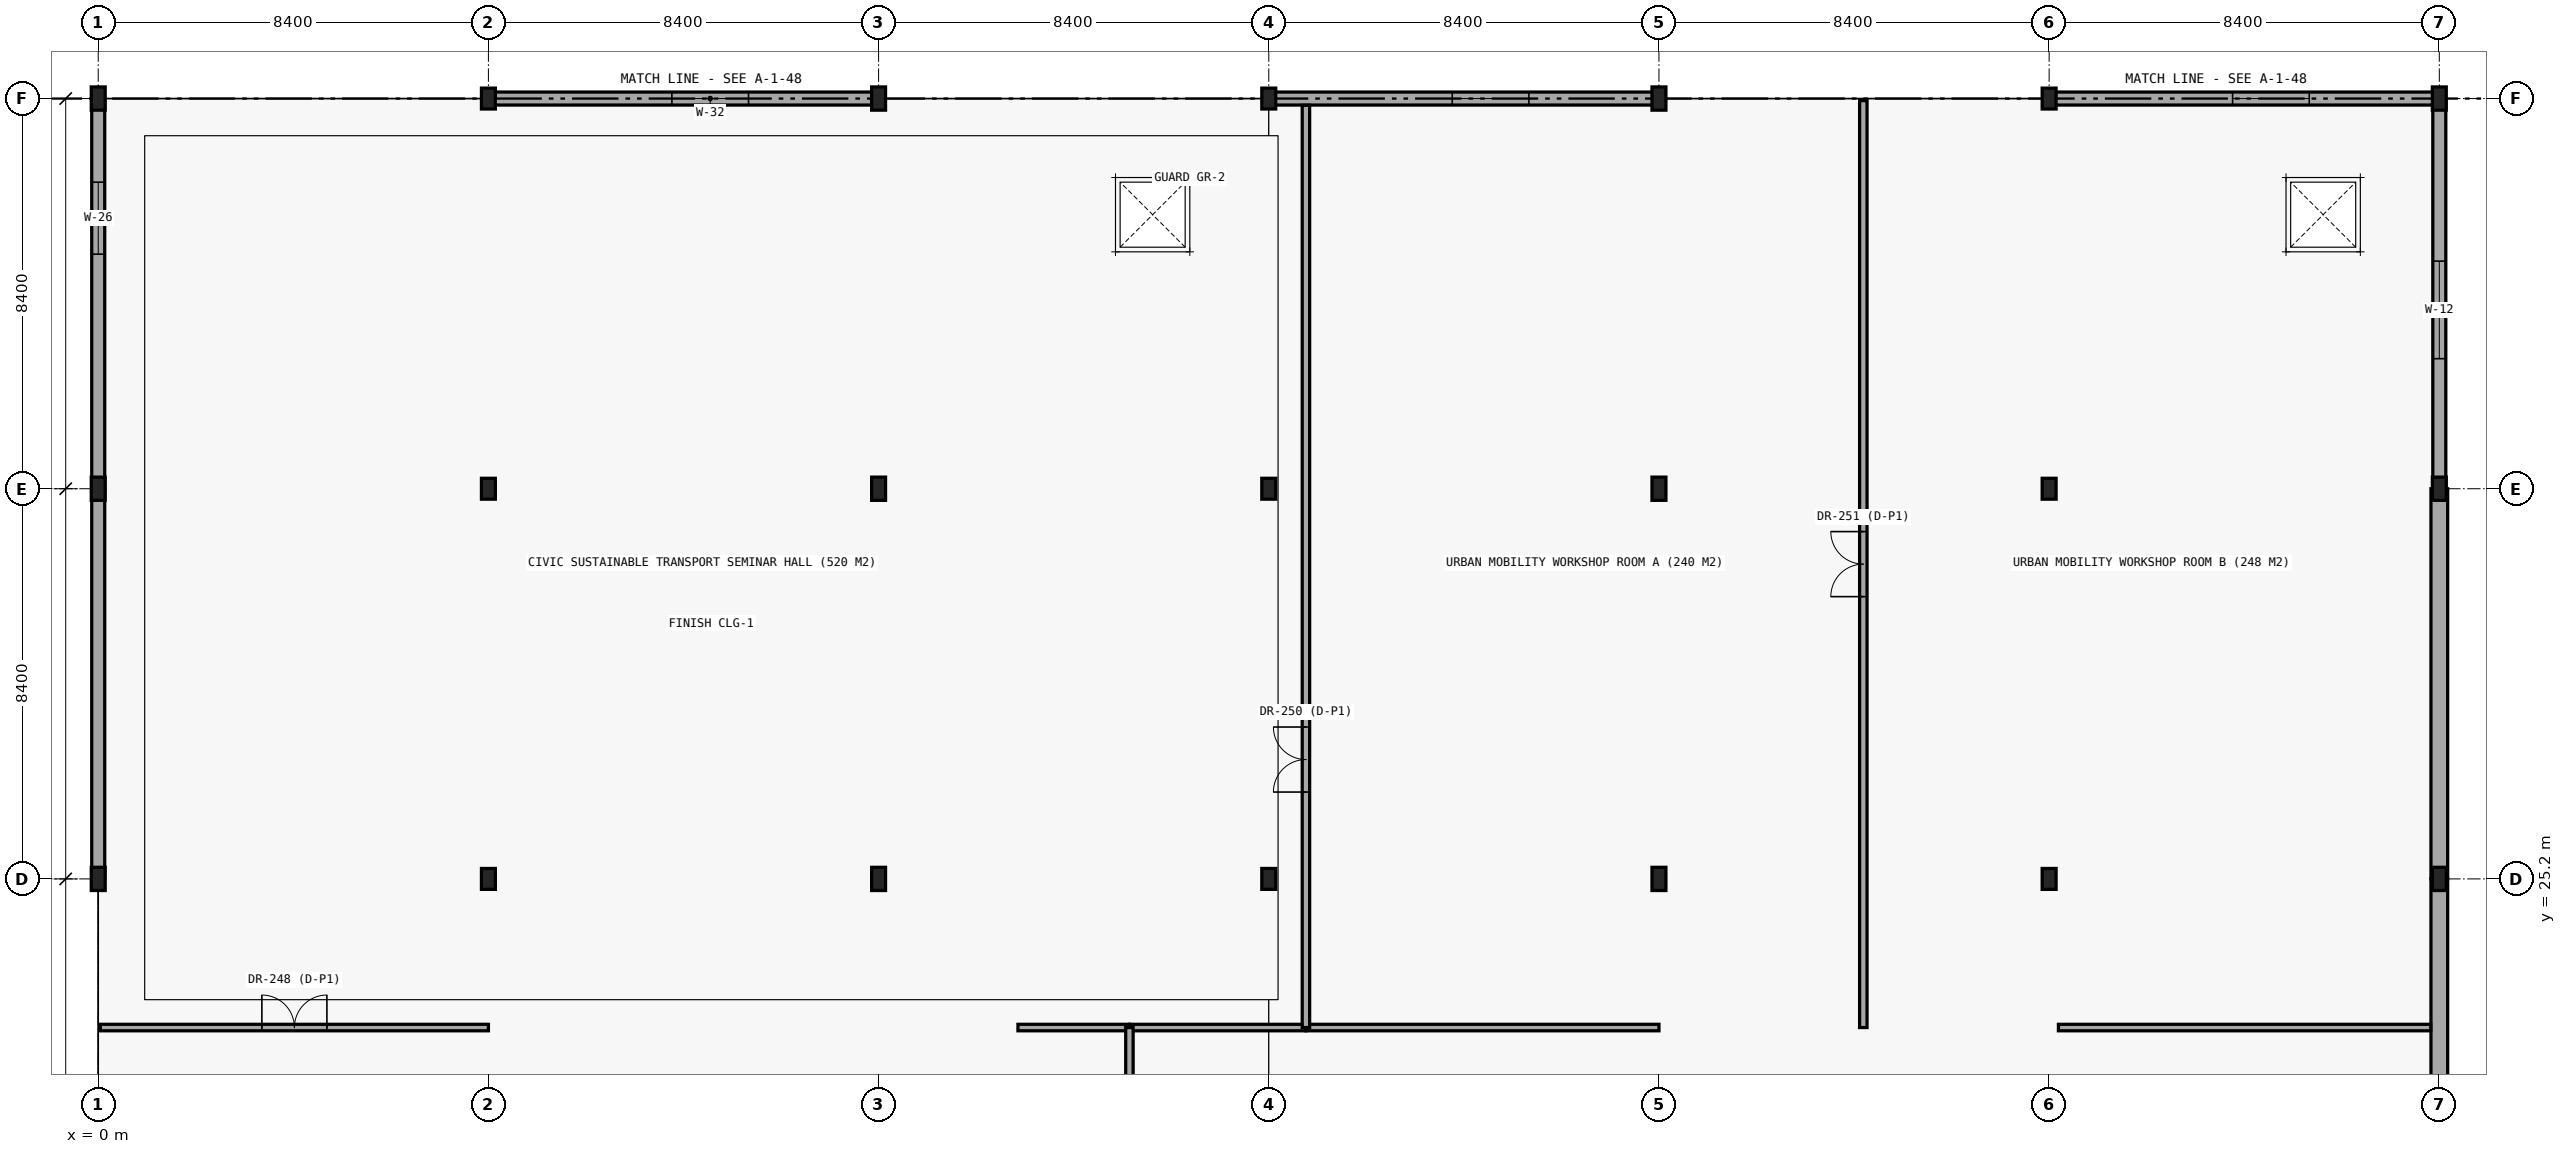
"""IFC4 building model, lengths in metres.
Left out: names, types, materials, properties, quantities, classifications, styles, units other than length and angle.
Written with IfcOpenShell. Run it as: python <this file> out.ifc"""

import sys

from ifc_helpers import new_model, si_unit, direction, frame, frame_2d, origin, origin_2d, place, context, subcontext, project, spatial, rectangle, i_section, extrude, element, fill, save


model = new_model("IFC4")
c1 = context("Model", 3, precision=1e-05, world=origin(), true_north=direction((0.0, 1.0)))
c2 = subcontext(c1, "Body", "Model", "MODEL_VIEW")
j1 = project(units=[si_unit("LENGTHUNIT", "METRE"), si_unit("PLANEANGLEUNIT", "RADIAN")], contexts=[c1])
p1 = place(None, origin())
s1 = spatial("IfcSite", under=j1, at=p1, CompositionType="ELEMENT")
p2 = place(p1, origin())
s2 = spatial("IfcBuilding", under=s1, at=p2, CompositionType="ELEMENT")
p3 = place(p2, frame((0.0, 0.0, 17.4)))
s3 = spatial("IfcBuildingStorey", under=s2, at=p3, CompositionType="ELEMENT", Elevation=17.4)
for number, where, z_axis, x_axis in (
    (1, (0.0, 25.2, 0.0), (0.0, 0.0, 1.0), (1.0, 0.0, 0.0)),
    (2, (0.0, 33.6, 0.0), (0.0, 0.0, 1.0), (1.0, 0.0, 0.0)),
    (3, (0.0, 42.0, 0.0), (0.0, 0.0, 1.0), (1.0, 0.0, 0.0)),
):
    element("IfcColumn", number, at=place(p3, frame(where, z_axis=z_axis, x_axis=x_axis)), inside=s3, PredefinedType="COLUMN", context=c2, shape_type="SweptSolid", body=[
        extrude(i_section(OverallWidth=0.3, OverallDepth=0.5, WebThickness=0.014, FlangeThickness=0.028, FilletRadius=0.027, at=origin_2d()), origin(), (0.0, 0.0, 1.0), 4.2),
    ])
for number, where, z_axis, x_axis in (
    (4, (8.4, 25.2, 0.0), (0.0, 0.0, 1.0), (1.0, 0.0, 0.0)),
    (5, (8.4, 33.6, 0.0), (0.0, 0.0, 1.0), (1.0, 0.0, 0.0)),
    (6, (8.4, 42.0, 0.0), (0.0, 0.0, 1.0), (1.0, 0.0, 0.0)),
):
    element("IfcColumn", number, at=place(p3, frame(where, z_axis=z_axis, x_axis=x_axis)), inside=s3, PredefinedType="COLUMN", context=c2, shape_type="SweptSolid", body=[
        extrude(i_section(OverallWidth=0.3, OverallDepth=0.45, WebThickness=0.014, FlangeThickness=0.026, FilletRadius=0.027, at=origin_2d()), origin(), (0.0, 0.0, 1.0), 4.2),
    ])
for number, where, z_axis, x_axis in (
    (7, (16.8, 25.2, 0.0), (0.0, 0.0, 1.0), (1.0, 0.0, 0.0)),
    (8, (16.8, 33.6, 0.0), (0.0, 0.0, 1.0), (1.0, 0.0, 0.0)),
    (9, (16.8, 42.0, 0.0), (0.0, 0.0, 1.0), (1.0, 0.0, 0.0)),
):
    element("IfcColumn", number, at=place(p3, frame(where, z_axis=z_axis, x_axis=x_axis)), inside=s3, PredefinedType="COLUMN", context=c2, shape_type="SweptSolid", body=[
        extrude(i_section(OverallWidth=0.3, OverallDepth=0.5, WebThickness=0.014, FlangeThickness=0.028, FilletRadius=0.027, at=origin_2d()), origin(), (0.0, 0.0, 1.0), 4.2),
    ])
for number, where, z_axis, x_axis in (
    (10, (25.2, 25.2, 0.0), (0.0, 0.0, 1.0), (1.0, 0.0, 0.0)),
    (11, (25.2, 33.6, 0.0), (0.0, 0.0, 1.0), (1.0, 0.0, 0.0)),
    (12, (25.2, 42.0, 0.0), (0.0, 0.0, 1.0), (1.0, 0.0, 0.0)),
):
    element("IfcColumn", number, at=place(p3, frame(where, z_axis=z_axis, x_axis=x_axis)), inside=s3, PredefinedType="COLUMN", context=c2, shape_type="SweptSolid", body=[
        extrude(i_section(OverallWidth=0.3, OverallDepth=0.45, WebThickness=0.014, FlangeThickness=0.026, FilletRadius=0.027, at=origin_2d()), origin(), (0.0, 0.0, 1.0), 4.2),
    ])
for number, where, z_axis, x_axis in (
    (13, (33.6, 25.2, 0.0), (0.0, 0.0, 1.0), (1.0, 0.0, 0.0)),
    (14, (33.6, 33.6, 0.0), (0.0, 0.0, 1.0), (1.0, 0.0, 0.0)),
    (15, (33.6, 42.0, 0.0), (0.0, 0.0, 1.0), (1.0, 0.0, 0.0)),
):
    element("IfcColumn", number, at=place(p3, frame(where, z_axis=z_axis, x_axis=x_axis)), inside=s3, PredefinedType="COLUMN", context=c2, shape_type="SweptSolid", body=[
        extrude(i_section(OverallWidth=0.3, OverallDepth=0.5, WebThickness=0.014, FlangeThickness=0.028, FilletRadius=0.027, at=origin_2d()), origin(), (0.0, 0.0, 1.0), 4.2),
    ])
for number, where, z_axis, x_axis in (
    (16, (42.0, 25.2, 0.0), (0.0, 0.0, 1.0), (1.0, 0.0, 0.0)),
    (17, (42.0, 33.6, 0.0), (0.0, 0.0, 1.0), (1.0, 0.0, 0.0)),
    (18, (42.0, 42.0, 0.0), (0.0, 0.0, 1.0), (1.0, 0.0, 0.0)),
):
    element("IfcColumn", number, at=place(p3, frame(where, z_axis=z_axis, x_axis=x_axis)), inside=s3, PredefinedType="COLUMN", context=c2, shape_type="SweptSolid", body=[
        extrude(i_section(OverallWidth=0.3, OverallDepth=0.45, WebThickness=0.014, FlangeThickness=0.026, FilletRadius=0.027, at=origin_2d()), origin(), (0.0, 0.0, 1.0), 4.2),
    ])
for number, where, z_axis, x_axis in (
    (19, (50.4, 25.2, 0.0), (0.0, 0.0, 1.0), (1.0, 0.0, 0.0)),
    (20, (50.4, 33.6, 0.0), (0.0, 0.0, 1.0), (1.0, 0.0, 0.0)),
    (21, (50.4, 42.0, 0.0), (0.0, 0.0, 1.0), (1.0, 0.0, 0.0)),
):
    element("IfcColumn", number, at=place(p3, frame(where, z_axis=z_axis, x_axis=x_axis)), inside=s3, PredefinedType="COLUMN", context=c2, shape_type="SweptSolid", body=[
        extrude(i_section(OverallWidth=0.3, OverallDepth=0.5, WebThickness=0.014, FlangeThickness=0.028, FilletRadius=0.027, at=origin_2d()), origin(), (0.0, 0.0, 1.0), 3.958),
    ])
p4 = place(p3, frame((0.0, 33.6, 0.0), z_axis=(0.0, 0.0, 1.0), x_axis=(0.0, -1.0, 0.0)))
e22 = element("IfcWall", 22, at=p4, inside=s3, PredefinedType="STANDARD", context=c2, shape_type="SweptSolid", body=[
    extrude(rectangle(XDim=8.4, YDim=0.28, at=frame_2d((4.2, 0.0))), origin(), (0.0, 0.0, 1.0), 3.62),
])
p5 = place(p3, frame((0.0, 42.0, 0.0), z_axis=(0.0, 0.0, 1.0), x_axis=(0.0, -1.0, 0.0)))
e23 = element("IfcWall", 23, at=p5, inside=s3, PredefinedType="STANDARD", context=c2, shape_type="SweptSolid", body=[
    extrude(rectangle(XDim=8.4, YDim=0.28, at=frame_2d((4.2, 0.0))), origin(), (0.0, 0.0, 1.0), 3.62),
])
p6 = place(p5, frame((1.8, 0.0, 0.85)))
e24 = element("IfcOpeningElement", 24, at=p6, cuts=e23, PredefinedType="OPENING", context=c2, shape_type="SweptSolid", body=[
    extrude(rectangle(XDim=1.55, YDim=2.45, at=frame_2d((0.775, 1.225))), frame((0.0, 0.15, 0.0), z_axis=(0.0, -1.0, 0.0), x_axis=(1.0, 0.0, 0.0)), (0.0, 0.0, 1.0), 0.3),
])
p7 = place(p3, frame((16.8, 42.0, 0.0), z_axis=(0.0, 0.0, 1.0), x_axis=(-1.0, 0.0, 0.0)))
e25 = element("IfcWall", 25, at=p7, inside=s3, PredefinedType="STANDARD", context=c2, shape_type="SweptSolid", body=[
    extrude(rectangle(XDim=8.4, YDim=0.28, at=frame_2d((4.2, 0.0))), origin(), (0.0, 0.0, 1.0), 3.62),
])
p8 = place(p7, frame((2.8, 0.0, 0.85)))
e26 = element("IfcOpeningElement", 26, at=p8, cuts=e25, PredefinedType="OPENING", context=c2, shape_type="SweptSolid", body=[
    extrude(rectangle(XDim=1.65, YDim=2.15, at=frame_2d((0.825, 1.075))), frame((0.0, 0.15, 0.0), z_axis=(0.0, -1.0, 0.0), x_axis=(1.0, 0.0, 0.0)), (0.0, 0.0, 1.0), 0.3),
])
p9 = place(p3, frame((33.6, 42.0, 0.0), z_axis=(0.0, 0.0, 1.0), x_axis=(-1.0, 0.0, 0.0)))
e27 = element("IfcWall", 27, at=p9, inside=s3, PredefinedType="STANDARD", context=c2, shape_type="SweptSolid", body=[
    extrude(rectangle(XDim=8.4, YDim=0.28, at=frame_2d((4.2, 0.0))), origin(), (0.0, 0.0, 1.0), 3.62),
])
p10 = place(p9, frame((2.8, 0.0, 0.85)))
e28 = element("IfcOpeningElement", 28, at=p10, cuts=e27, PredefinedType="OPENING", context=c2, shape_type="SweptSolid", body=[
    extrude(rectangle(XDim=1.65, YDim=2.15, at=frame_2d((0.825, 1.075))), frame((0.0, 0.15, 0.0), z_axis=(0.0, -1.0, 0.0), x_axis=(1.0, 0.0, 0.0)), (0.0, 0.0, 1.0), 0.3),
])
p11 = place(p3, frame((50.4, 42.0, 0.0), z_axis=(0.0, 0.0, 1.0), x_axis=(-1.0, 0.0, 0.0)))
e29 = element("IfcWall", 29, at=p11, inside=s3, PredefinedType="STANDARD", context=c2, shape_type="SweptSolid", body=[
    extrude(rectangle(XDim=8.4, YDim=0.28, at=frame_2d((4.2, 0.0))), origin(), (0.0, 0.0, 1.0), 3.62),
])
p12 = place(p11, frame((2.8, 0.0, 0.85)))
e30 = element("IfcOpeningElement", 30, at=p12, cuts=e29, PredefinedType="OPENING", context=c2, shape_type="SweptSolid", body=[
    extrude(rectangle(XDim=1.65, YDim=2.15, at=frame_2d((0.825, 1.075))), frame((0.0, 0.15, 0.0), z_axis=(0.0, -1.0, 0.0), x_axis=(1.0, 0.0, 0.0)), (0.0, 0.0, 1.0), 0.3),
])
p13 = place(p3, frame((50.4, 16.8, 0.0), z_axis=(0.0, 0.0, 1.0), x_axis=(0.0, 1.0, 0.0)))
e31 = element("IfcWall", 31, at=p13, inside=s3, PredefinedType="STANDARD", context=c2, shape_type="SweptSolid", body=[
    extrude(rectangle(XDim=8.4, YDim=0.36, at=frame_2d((4.2, 0.0))), origin(), (0.0, 0.0, 1.0), 3.62),
])
p14 = place(p3, frame((50.4, 25.2, 0.0), z_axis=(0.0, 0.0, 1.0), x_axis=(0.0, 1.0, 0.0)))
e32 = element("IfcWall", 32, at=p14, inside=s3, PredefinedType="STANDARD", context=c2, shape_type="SweptSolid", body=[
    extrude(rectangle(XDim=8.4, YDim=0.36, at=frame_2d((4.2, 0.0))), origin(), (0.0, 0.0, 1.0), 3.62),
])
p15 = place(p3, frame((50.4, 33.6, 0.0), z_axis=(0.0, 0.0, 1.0), x_axis=(0.0, 1.0, 0.0)))
e33 = element("IfcWall", 33, at=p15, inside=s3, PredefinedType="STANDARD", context=c2, shape_type="SweptSolid", body=[
    extrude(rectangle(XDim=8.4, YDim=0.28, at=frame_2d((4.2, 0.0))), origin(), (0.0, 0.0, 1.0), 3.62),
])
p16 = place(p15, frame((2.8, 0.0, 0.9)))
e34 = element("IfcOpeningElement", 34, at=p16, cuts=e33, PredefinedType="OPENING", context=c2, shape_type="SweptSolid", body=[
    extrude(rectangle(XDim=2.1, YDim=2.1, at=frame_2d((1.05, 1.05))), frame((0.0, 0.15, 0.0), z_axis=(0.0, -1.0, 0.0), x_axis=(1.0, 0.0, 0.0)), (0.0, 0.0, 1.0), 0.3),
])
p17 = place(p3, frame((0.045, 22.0, 0.0), z_axis=(0.0, 0.0, 1.0), x_axis=(1.0, 0.0, 0.0)))
e35 = element("IfcWall", 35, at=p17, inside=s3, PredefinedType="PARTITIONING", context=c2, shape_type="SweptSolid", body=[
    extrude(rectangle(XDim=8.355, YDim=0.14, at=frame_2d((4.177, 0.0))), origin(), (0.0, 0.0, 1.0), 3.5),
])
p18 = place(p17, frame((3.478, 0.0, 0.0)))
e36 = element("IfcOpeningElement", 36, at=p18, cuts=e35, PredefinedType="OPENING", context=c2, shape_type="SweptSolid", body=[
    extrude(rectangle(XDim=1.4, YDim=2.25, at=frame_2d((0.7, 1.125))), frame((0.0, 0.08, 0.0), z_axis=(0.0, -1.0, 0.0), x_axis=(1.0, 0.0, 0.0)), (0.0, 0.0, 1.0), 0.16),
])
p19 = place(p3, frame((19.8, 22.0, 0.0), z_axis=(0.0, 0.0, 1.0), x_axis=(1.0, 0.0, 0.0)))
e37 = element("IfcWall", 37, at=p19, inside=s3, PredefinedType="PARTITIONING", context=c2, shape_type="SweptSolid", body=[
    extrude(rectangle(XDim=2.4, YDim=0.14, at=frame_2d((1.2, 0.0))), origin(), (0.0, 0.0, 1.0), 3.5),
])
p20 = place(p3, frame((22.2, 22.0, 0.0), z_axis=(0.0, 0.0, 1.0), x_axis=(1.0, 0.0, 0.0)))
e38 = element("IfcWall", 38, at=p20, inside=s3, PredefinedType="PARTITIONING", context=c2, shape_type="SweptSolid", body=[
    extrude(rectangle(XDim=3.8, YDim=0.14, at=frame_2d((1.9, 0.0))), origin(), (0.0, 0.0, 1.0), 3.5),
])
p21 = place(p3, frame((26.0, 22.0, 0.0), z_axis=(0.0, 0.0, 1.0), x_axis=(1.0, 0.0, 0.0)))
e39 = element("IfcWall", 39, at=p21, inside=s3, PredefinedType="PARTITIONING", context=c2, shape_type="SweptSolid", body=[
    extrude(rectangle(XDim=7.6, YDim=0.14, at=frame_2d((3.8, 0.0))), origin(), (0.0, 0.0, 1.0), 3.5),
])
p22 = place(p3, frame((42.2, 22.0, 0.0), z_axis=(0.0, 0.0, 1.0), x_axis=(1.0, 0.0, 0.0)))
e40 = element("IfcWall", 40, at=p22, inside=s3, PredefinedType="PARTITIONING", context=c2, shape_type="SweptSolid", body=[
    extrude(rectangle(XDim=8.015, YDim=0.14, at=frame_2d((4.008, 0.0))), origin(), (0.0, 0.0, 1.0), 3.5),
])
p23 = place(p3, frame((22.2, 5.4, 0.0), z_axis=(0.0, 0.0, 1.0), x_axis=(0.0, 1.0, 0.0)))
e41 = element("IfcWall", 41, at=p23, inside=s3, PredefinedType="PARTITIONING", context=c2, shape_type="SweptSolid", body=[
    extrude(rectangle(XDim=16.6, YDim=0.16, at=frame_2d((8.3, 0.0))), origin(), (0.0, 0.0, 1.0), 3.5),
])
p24 = place(p23, frame((4.72, 0.0, 0.0)))
e42 = element("IfcOpeningElement", 42, at=p24, cuts=e41, PredefinedType="OPENING", context=c2, shape_type="SweptSolid", body=[
    extrude(rectangle(XDim=1.0, YDim=2.15, at=frame_2d((0.5, 1.075))), frame((0.0, 0.09, 0.0), z_axis=(0.0, -1.0, 0.0), x_axis=(1.0, 0.0, 0.0)), (0.0, 0.0, 1.0), 0.18),
])
p25 = place(p3, frame((26.0, 22.0, 0.0), z_axis=(0.0, 0.0, 1.0), x_axis=(0.0, 1.0, 0.0)))
e43 = element("IfcWall", 43, at=p25, inside=s3, PredefinedType="PARTITIONING", context=c2, shape_type="SweptSolid", body=[
    extrude(rectangle(XDim=19.855, YDim=0.16, at=frame_2d((9.927, 0.0))), origin(), (0.0, 0.0, 1.0), 3.5),
])
p26 = place(p25, frame((5.07, 0.0, 0.0)))
e44 = element("IfcOpeningElement", 44, at=p26, cuts=e43, PredefinedType="OPENING", context=c2, shape_type="SweptSolid", body=[
    extrude(rectangle(XDim=1.4, YDim=2.25, at=frame_2d((0.7, 1.125))), frame((0.0, 0.09, 0.0), z_axis=(0.0, -1.0, 0.0), x_axis=(1.0, 0.0, 0.0)), (0.0, 0.0, 1.0), 0.18),
])
p27 = place(p3, frame((38.0, 22.0, 0.0), z_axis=(0.0, 0.0, 1.0), x_axis=(0.0, 1.0, 0.0)))
e45 = element("IfcWall", 45, at=p27, inside=s3, PredefinedType="PARTITIONING", context=c2, shape_type="SweptSolid", body=[
    extrude(rectangle(XDim=19.955, YDim=0.16, at=frame_2d((9.978, 0.0))), origin(), (0.0, 0.0, 1.0), 3.5),
])
p28 = place(p27, frame((9.277, 0.0, 0.0)))
e46 = element("IfcOpeningElement", 46, at=p28, cuts=e45, PredefinedType="OPENING", context=c2, shape_type="SweptSolid", body=[
    extrude(rectangle(XDim=1.4, YDim=2.25, at=frame_2d((0.7, 1.125))), frame((0.0, 0.09, 0.0), z_axis=(0.0, -1.0, 0.0), x_axis=(1.0, 0.0, 0.0)), (0.0, 0.0, 1.0), 0.18),
])
p29 = place(p6, origin())
e47 = element("IfcWindow", 47, at=p29, inside=s3, PartitioningType="SINGLE_PANEL", PredefinedType="WINDOW", context=c2, shape_type="SweptSolid", body=[
    extrude(rectangle(XDim=1.55, YDim=2.45, at=frame_2d((0.775, 1.225))), frame((0.0, 0.03, 0.0), z_axis=(0.0, -1.0, 0.0), x_axis=(1.0, 0.0, 0.0)), (0.0, 0.0, 1.0), 0.06),
])
fill(e24, e47)
p30 = place(p8, origin())
e48 = element("IfcWindow", 48, at=p30, inside=s3, PartitioningType="SINGLE_PANEL", PredefinedType="WINDOW", context=c2, shape_type="SweptSolid", body=[
    extrude(rectangle(XDim=1.65, YDim=2.15, at=frame_2d((0.825, 1.075))), frame((0.0, 0.03, 0.0), z_axis=(0.0, -1.0, 0.0), x_axis=(1.0, 0.0, 0.0)), (0.0, 0.0, 1.0), 0.06),
])
fill(e26, e48)
p31 = place(p10, origin())
e49 = element("IfcWindow", 49, at=p31, inside=s3, PartitioningType="SINGLE_PANEL", PredefinedType="WINDOW", context=c2, shape_type="SweptSolid", body=[
    extrude(rectangle(XDim=1.65, YDim=2.15, at=frame_2d((0.825, 1.075))), frame((0.0, 0.03, 0.0), z_axis=(0.0, -1.0, 0.0), x_axis=(1.0, 0.0, 0.0)), (0.0, 0.0, 1.0), 0.06),
])
fill(e28, e49)
p32 = place(p12, origin())
e50 = element("IfcWindow", 50, at=p32, inside=s3, PartitioningType="SINGLE_PANEL", PredefinedType="WINDOW", context=c2, shape_type="SweptSolid", body=[
    extrude(rectangle(XDim=1.65, YDim=2.15, at=frame_2d((0.825, 1.075))), frame((0.0, 0.03, 0.0), z_axis=(0.0, -1.0, 0.0), x_axis=(1.0, 0.0, 0.0)), (0.0, 0.0, 1.0), 0.06),
])
fill(e30, e50)
p33 = place(p16, origin())
e51 = element("IfcWindow", 51, at=p33, inside=s3, PartitioningType="SINGLE_PANEL", PredefinedType="WINDOW", context=c2, shape_type="SweptSolid", body=[
    extrude(rectangle(XDim=2.1, YDim=2.1, at=frame_2d((1.05, 1.05))), frame((0.0, 0.03, 0.0), z_axis=(0.0, -1.0, 0.0), x_axis=(1.0, 0.0, 0.0)), (0.0, 0.0, 1.0), 0.06),
])
fill(e34, e51)
p34 = place(p18, origin())
e52 = element("IfcDoor", 52, at=p34, inside=s3, OperationType="DOUBLE_DOOR_SINGLE_SWING", PredefinedType="DOOR", context=c2, shape_type="SweptSolid", body=[
    extrude(rectangle(XDim=1.4, YDim=2.25, at=frame_2d((0.7, 1.125))), frame((0.0, 0.025, 0.0), z_axis=(0.0, -1.0, 0.0), x_axis=(1.0, 0.0, 0.0)), (0.0, 0.0, 1.0), 0.05),
])
fill(e36, e52)
p35 = place(p26, origin())
e53 = element("IfcDoor", 53, at=p35, inside=s3, OperationType="DOUBLE_DOOR_SINGLE_SWING", PredefinedType="DOOR", context=c2, shape_type="SweptSolid", body=[
    extrude(rectangle(XDim=1.4, YDim=2.25, at=frame_2d((0.7, 1.125))), frame((0.0, 0.025, 0.0), z_axis=(0.0, -1.0, 0.0), x_axis=(1.0, 0.0, 0.0)), (0.0, 0.0, 1.0), 0.05),
])
fill(e44, e53)
p36 = place(p28, origin())
e54 = element("IfcDoor", 54, at=p36, inside=s3, OperationType="DOUBLE_DOOR_SINGLE_SWING", PredefinedType="DOOR", context=c2, shape_type="SweptSolid", body=[
    extrude(rectangle(XDim=1.4, YDim=2.25, at=frame_2d((0.7, 1.125))), frame((0.0, 0.025, 0.0), z_axis=(0.0, -1.0, 0.0), x_axis=(1.0, 0.0, 0.0)), (0.0, 0.0, 1.0), 0.05),
])
fill(e46, e54)
save(model, sys.argv[1])
